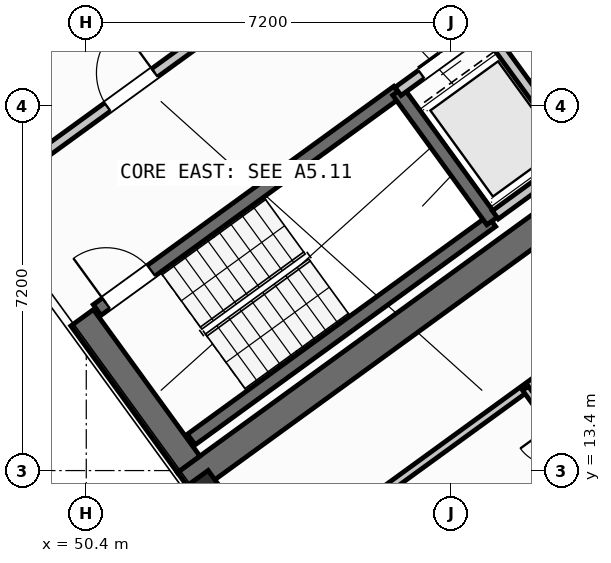
"""IFC4 building model, lengths in metres.
Left out: names, types, materials, properties, quantities, classifications, styles, units other than length and angle.
Written with IfcOpenShell. Run it as: python <this file> out.ifc"""

import sys

from ifc_helpers import new_model, si_unit, direction, frame, frame_2d, origin, origin_2d, place, context, subcontext, project, spatial, rectangle, hollow_rectangle, extrude, source, transform, mapped, element, fill, save


model = new_model("IFC4")
c1 = context("Model", 3, precision=1e-05, world=origin(), true_north=direction((0.0, 1.0)))
c2 = subcontext(c1, "Body", "Model", "MODEL_VIEW")
j1 = project(units=[si_unit("LENGTHUNIT", "METRE"), si_unit("PLANEANGLEUNIT", "RADIAN")], contexts=[c1])
p1 = place(None, origin())
s1 = spatial("IfcSite", under=j1, at=p1, CompositionType="ELEMENT")
p2 = place(p1, origin())
s2 = spatial("IfcBuilding", under=s1, at=p2, CompositionType="ELEMENT")
p3 = place(p2, frame((0.0, 0.0, 144.3)))
s3 = spatial("IfcBuildingStorey", under=s2, at=p3, CompositionType="ELEMENT", Elevation=144.3)
p4 = place(p3, frame((52.359, 13.14, 0.0), z_axis=(0.0, 0.0, 1.0), x_axis=(0.809014896919, 0.587788139183, 0.0)))
e1 = element("IfcWall", 1, at=p4, inside=s3, PredefinedType="SHEAR", context=c2, shape_type="SweptSolid", body=[
    extrude(rectangle(XDim=12.34, YDim=0.55, at=frame_2d((6.17, 0.0))), origin(), (0.0, 0.0, 1.0), 3.35),
])
p5 = place(p3, frame((52.42, 13.524, 0.0), z_axis=(0.0, 0.0, 1.0), x_axis=(-0.587802113096, 0.809004744015, 0.0)))
e2 = element("IfcWall", 2, at=p5, inside=s3, PredefinedType="SHEAR", context=c2, shape_type="SweptSolid", body=[
    extrude(rectangle(XDim=3.575, YDim=0.55, at=frame_2d((1.788, 0.0))), origin(), (0.0, 0.0, 1.0), 3.35),
])
m1 = source(origin(), c2, "Body", "SweptSolid", [
    extrude(hollow_rectangle(XDim=0.9, YDim=0.9, WallThickness=0.036, at=origin_2d()), origin(), (0.0, 0.0, 1.0), 3.6),
])
p6 = place(p3, frame((52.705, 12.773, 0.0), z_axis=(0.0, 0.0, 1.0), x_axis=(0.809016994375, 0.587785252292, 0.0)))
e3 = element("IfcColumn", 3, at=p6, inside=s3, PredefinedType="COLUMN", context=c2, shape_type="MappedRepresentation", body=[
    mapped(m1, transform((0.0, 0.0, 0.0), scale=1.0)),
])
p7 = place(p3, frame((58.455, 35.484, 0.0), z_axis=(0.0, 0.0, 1.0), x_axis=(0.587783625747, -0.809018176127, 0.0)))
e4 = element("IfcWall", 4, at=p7, inside=s3, PredefinedType="STANDARD", context=c2, shape_type="SweptSolid", body=[
    extrude(rectangle(XDim=21.587, YDim=0.32, at=frame_2d((10.794, 0.0))), origin(), (0.0, 0.0, 1.0), 2.775),
])
p8 = place(p7, frame((2.994, 0.0, 0.8)))
e5 = element("IfcOpeningElement", 5, at=p8, cuts=e4, PredefinedType="OPENING", context=c2, shape_type="SweptSolid", body=[
    extrude(rectangle(XDim=2.1, YDim=1.55, at=frame_2d((1.05, 0.775))), frame((0.0, 0.17, 0.0), z_axis=(0.0, -1.0, 0.0), x_axis=(1.0, 0.0, 0.0)), (0.0, 0.0, 1.0), 0.34),
])
p9 = place(p7, frame((11.959, 0.0, 0.85)))
e6 = element("IfcOpeningElement", 6, at=p9, cuts=e4, PredefinedType="OPENING", context=c2, shape_type="SweptSolid", body=[
    extrude(rectangle(XDim=1.8, YDim=1.5, at=frame_2d((0.9, 0.75))), frame((0.0, 0.17, 0.0), z_axis=(0.0, -1.0, 0.0), x_axis=(1.0, 0.0, 0.0)), (0.0, 0.0, 1.0), 0.34),
])
p10 = place(p7, frame((18.56, 0.0, 0.85)))
e7 = element("IfcOpeningElement", 7, at=p10, cuts=e4, PredefinedType="OPENING", context=c2, shape_type="SweptSolid", body=[
    extrude(rectangle(XDim=1.5, YDim=1.5, at=frame_2d((0.75, 0.75))), frame((0.0, 0.17, 0.0), z_axis=(0.0, -1.0, 0.0), x_axis=(1.0, 0.0, 0.0)), (0.0, 0.0, 1.0), 0.34),
])
p11 = place(p3, frame((71.098, 17.731, 0.0), z_axis=(0.0, 0.0, 1.0), x_axis=(-0.809021120468, -0.587779573171, 0.0)))
e8 = element("IfcWall", 8, at=p11, inside=s3, PredefinedType="STANDARD", context=c2, shape_type="SweptSolid", body=[
    extrude(rectangle(XDim=17.588, YDim=0.32, at=frame_2d((8.794, 0.0))), origin(), (0.0, 0.0, 1.0), 3.35),
])
p12 = place(p11, frame((1.624, 0.0, 0.0)))
e9 = element("IfcOpeningElement", 9, at=p12, cuts=e8, PredefinedType="OPENING", context=c2, shape_type="SweptSolid", body=[
    extrude(rectangle(XDim=1.05, YDim=2.15, at=frame_2d((0.525, 1.075))), frame((0.0, 0.17, 0.0), z_axis=(0.0, -1.0, 0.0), x_axis=(1.0, 0.0, 0.0)), (0.0, 0.0, 1.0), 0.34),
])
p13 = place(p11, frame((4.104, 0.0, 1.0)))
e10 = element("IfcOpeningElement", 10, at=p13, cuts=e8, PredefinedType="OPENING", context=c2, shape_type="SweptSolid", body=[
    extrude(rectangle(XDim=0.9, YDim=1.25, at=frame_2d((0.45, 0.625))), frame((0.0, 0.17, 0.0), z_axis=(0.0, -1.0, 0.0), x_axis=(1.0, 0.0, 0.0)), (0.0, 0.0, 1.0), 0.34),
])
p14 = place(p11, frame((7.879, 0.0, 0.85)))
e11 = element("IfcOpeningElement", 11, at=p14, cuts=e8, PredefinedType="OPENING", context=c2, shape_type="SweptSolid", body=[
    extrude(rectangle(XDim=1.8, YDim=1.5, at=frame_2d((0.9, 0.75))), frame((0.0, 0.17, 0.0), z_axis=(0.0, -1.0, 0.0), x_axis=(1.0, 0.0, 0.0)), (0.0, 0.0, 1.0), 0.34),
])
p15 = place(p11, frame((12.849, 0.0, 0.85)))
e12 = element("IfcOpeningElement", 12, at=p15, cuts=e8, PredefinedType="OPENING", context=c2, shape_type="SweptSolid", body=[
    extrude(rectangle(XDim=1.8, YDim=1.5, at=frame_2d((0.9, 0.75))), frame((0.0, 0.17, 0.0), z_axis=(0.0, -1.0, 0.0), x_axis=(1.0, 0.0, 0.0)), (0.0, 0.0, 1.0), 0.34),
])
p16 = place(p3, frame((52.472, 14.013, 0.0), z_axis=(0.0, 0.0, 1.0), x_axis=(0.809028366311, 0.587769599847, 0.0)))
e13 = element("IfcWall", 13, at=p16, inside=s3, PredefinedType="SHEAR", context=c2, shape_type="SweptSolid", body=[
    extrude(rectangle(XDim=7.33, YDim=0.26, at=frame_2d((3.665, 0.0))), origin(), (0.0, 0.0, 1.0), 3.35),
])
p17 = place(p3, frame((50.615, 16.57, 0.0), z_axis=(0.0, 0.0, 1.0), x_axis=(0.809028366311, 0.587769599847, 0.0)))
e14 = element("IfcWall", 14, at=p17, inside=s3, PredefinedType="SHEAR", context=c2, shape_type="SweptSolid", body=[
    extrude(rectangle(XDim=7.33, YDim=0.26, at=frame_2d((3.665, 0.0))), origin(), (0.0, 0.0, 1.0), 3.35),
])
p18 = place(p17, frame((0.22, 0.0, 0.0)))
e15 = element("IfcOpeningElement", 15, at=p18, cuts=e14, PredefinedType="OPENING", context=c2, shape_type="SweptSolid", body=[
    extrude(rectangle(XDim=1.1, YDim=2.1, at=frame_2d((0.55, 1.05))), frame((0.0, 0.14, 0.0), z_axis=(0.0, -1.0, 0.0), x_axis=(1.0, 0.0, 0.0)), (0.0, 0.0, 1.0), 0.28),
])
p19 = place(p3, frame((58.41, 18.327, 0.0), z_axis=(0.0, 0.0, 1.0), x_axis=(-0.58776738483, 0.809029975545, 0.0)))
e16 = element("IfcWall", 16, at=p19, inside=s3, PredefinedType="SHEAR", context=c2, shape_type="SweptSolid", body=[
    extrude(rectangle(XDim=3.16, YDim=0.26, at=frame_2d((1.58, 0.0))), origin(), (0.0, 0.0, 1.0), 3.35),
])
p20 = place(p3, frame((47.065, 21.407, 0.0), z_axis=(0.0, 0.0, 1.0), x_axis=(0.809032984992, 0.587763242466, 0.0)))
e17 = element("IfcWall", 17, at=p20, inside=s3, PredefinedType="STANDARD", context=c2, shape_type="SweptSolid", body=[
    extrude(rectangle(XDim=3.448, YDim=0.2, at=frame_2d((1.724, 0.0))), origin(), (0.0, 0.0, 1.0), 3.34),
])
p21 = place(p20, frame((0.458, 0.0, 0.0)))
e18 = element("IfcOpeningElement", 18, at=p21, cuts=e17, PredefinedType="OPENING", context=c2, shape_type="SweptSolid", body=[
    extrude(rectangle(XDim=1.3, YDim=2.2, at=frame_2d((0.65, 1.1))), frame((0.0, 0.11, 0.0), z_axis=(0.0, -1.0, 0.0), x_axis=(1.0, 0.0, 0.0)), (0.0, 0.0, 1.0), 0.22),
])
p22 = place(p3, frame((48.758, 19.077, 0.0), z_axis=(0.0, 0.0, 1.0), x_axis=(0.809005065155, 0.587801671104, 0.0)))
e19 = element("IfcWall", 19, at=p22, inside=s3, PredefinedType="STANDARD", context=c2, shape_type="SweptSolid", body=[
    extrude(rectangle(XDim=5.768, YDim=0.2, at=frame_2d((2.884, 0.0))), origin(), (0.0, 0.0, 1.0), 3.34),
])
p23 = place(p22, frame((2.548, 0.0, 0.0)))
e20 = element("IfcOpeningElement", 20, at=p23, cuts=e19, PredefinedType="OPENING", context=c2, shape_type="SweptSolid", body=[
    extrude(rectangle(XDim=1.15, YDim=2.1, at=frame_2d((0.575, 1.05))), frame((0.0, 0.11, 0.0), z_axis=(0.0, -1.0, 0.0), x_axis=(1.0, 0.0, 0.0)), (0.0, 0.0, 1.0), 0.22),
])
p24 = place(p3, frame((56.553, 20.884, 0.0), z_axis=(0.0, 0.0, 1.0), x_axis=(0.809023564264, 0.58777620951, 0.0)))
e21 = element("IfcWall", 21, at=p24, inside=s3, PredefinedType="STANDARD", context=c2, shape_type="SweptSolid", body=[
    extrude(rectangle(XDim=3.818, YDim=0.2, at=frame_2d((1.909, 0.0))), origin(), (0.0, 0.0, 1.0), 3.34),
])
p25 = place(p24, frame((0.57, 0.0, 0.0)))
e22 = element("IfcOpeningElement", 22, at=p25, cuts=e21, PredefinedType="OPENING", context=c2, shape_type="SweptSolid", body=[
    extrude(rectangle(XDim=1.1, YDim=2.15, at=frame_2d((0.55, 1.075))), frame((0.0, 0.11, 0.0), z_axis=(0.0, -1.0, 0.0), x_axis=(1.0, 0.0, 0.0)), (0.0, 0.0, 1.0), 0.22),
])
p26 = place(p24, frame((2.65, 0.0, 0.0)))
e23 = element("IfcOpeningElement", 23, at=p26, cuts=e21, PredefinedType="OPENING", context=c2, shape_type="SweptSolid", body=[
    extrude(rectangle(XDim=0.86, YDim=2.05, at=frame_2d((0.43, 1.025))), frame((0.0, 0.11, 0.0), z_axis=(0.0, -1.0, 0.0), x_axis=(1.0, 0.0, 0.0)), (0.0, 0.0, 1.0), 0.22),
])
p27 = place(p3, frame((60.067, 19.655, 0.0), z_axis=(0.0, 0.0, 1.0), x_axis=(-0.587800520745, 0.809005900975, 0.0)))
e24 = element("IfcWall", 24, at=p27, inside=s3, PredefinedType="STANDARD", context=c2, shape_type="SweptSolid", body=[
    extrude(rectangle(XDim=2.66, YDim=0.2, at=frame_2d((1.33, 0.0))), origin(), (0.0, 0.0, 1.0), 3.34),
])
p28 = place(p3, frame((58.472, 18.447, 0.0), z_axis=(0.0, 0.0, 1.0), x_axis=(0.809018631237, 0.587782999339, 0.0)))
e25 = element("IfcWall", 25, at=p28, inside=s3, PredefinedType="STANDARD", context=c2, shape_type="SweptSolid", body=[
    extrude(rectangle(XDim=3.698, YDim=0.2, at=frame_2d((1.849, 0.0))), origin(), (0.0, 0.0, 1.0), 3.34),
])
p29 = place(p3, frame((53.705, 11.126, 0.0), z_axis=(0.0, 0.0, 1.0), x_axis=(0.809014504436, 0.587788679384, 0.0)))
e26 = element("IfcWall", 26, at=p29, inside=s3, PredefinedType="PARTITIONING", context=c2, shape_type="SweptSolid", body=[
    extrude(rectangle(XDim=14.67, YDim=0.16, at=frame_2d((7.335, 0.0))), origin(), (0.0, 0.0, 1.0), 3.34),
])
p30 = place(p29, frame((10.2, 0.0, 0.0)))
e27 = element("IfcOpeningElement", 27, at=p30, cuts=e26, PredefinedType="OPENING", context=c2, shape_type="SweptSolid", body=[
    extrude(rectangle(XDim=1.0, YDim=2.1, at=frame_2d((0.5, 1.05))), frame((0.0, 0.09, 0.0), z_axis=(0.0, -1.0, 0.0), x_axis=(1.0, 0.0, 0.0)), (0.0, 0.0, 1.0), 0.18),
])
p31 = place(p3, frame((56.249, 9.785, 0.0), z_axis=(0.0, 0.0, 1.0), x_axis=(0.809011747655, 0.587792473715, 0.0)))
e28 = element("IfcWall", 28, at=p31, inside=s3, PredefinedType="PLUMBINGWALL", context=c2, shape_type="SweptSolid", body=[
    extrude(rectangle(XDim=13.4, YDim=0.14, at=frame_2d((6.7, 0.0))), origin(), (0.0, 0.0, 1.0), 3.34),
])
p32 = place(p31, frame((8.94, 0.0, 0.0)))
e29 = element("IfcOpeningElement", 29, at=p32, cuts=e28, PredefinedType="OPENING", context=c2, shape_type="SweptSolid", body=[
    extrude(rectangle(XDim=0.92, YDim=2.08, at=frame_2d((0.46, 1.04))), frame((0.0, 0.08, 0.0), z_axis=(0.0, -1.0, 0.0), x_axis=(1.0, 0.0, 0.0)), (0.0, 0.0, 1.0), 0.16),
])
p33 = place(p3, frame((60.585, 12.936, 0.0), z_axis=(0.0, 0.0, 1.0), x_axis=(-0.587772116736, 0.809026537752, 0.0)))
e30 = element("IfcWall", 30, at=p33, inside=s3, PredefinedType="PLUMBINGWALL", context=c2, shape_type="SweptSolid", body=[
    extrude(rectangle(XDim=2.58, YDim=0.14, at=frame_2d((1.29, 0.0))), origin(), (0.0, 0.0, 1.0), 3.34),
])
p34 = place(p33, frame((0.9, 0.0, 0.0)))
e31 = element("IfcOpeningElement", 31, at=p34, cuts=e30, PredefinedType="OPENING", context=c2, shape_type="SweptSolid", body=[
    extrude(rectangle(XDim=0.78, YDim=2.05, at=frame_2d((0.39, 1.025))), frame((0.0, 0.08, 0.0), z_axis=(0.0, -1.0, 0.0), x_axis=(1.0, 0.0, 0.0)), (0.0, 0.0, 1.0), 0.16),
])
m2 = source(origin(), c2, "Body", "SweptSolid", [
    extrude(rectangle(XDim=1.1, YDim=2.1, at=frame_2d((0.55, 1.05))), frame((0.0, 0.025, 0.0), z_axis=(0.0, -1.0, 0.0), x_axis=(1.0, 0.0, 0.0)), (0.0, 0.0, 1.0), 0.05),
])
p35 = place(p18, origin())
e32 = element("IfcDoor", 32, at=p35, inside=s3, OperationType="SINGLE_SWING_LEFT", PredefinedType="DOOR", context=c2, shape_type="MappedRepresentation", body=[
    mapped(m2, transform((0.0, 0.0, 0.0), scale=1.0)),
])
fill(e15, e32)
m3 = source(origin(), c2, "Body", "SweptSolid", [
    extrude(rectangle(XDim=1.15, YDim=2.1, at=frame_2d((0.575, 1.05))), frame((0.0, 0.025, 0.0), z_axis=(0.0, -1.0, 0.0), x_axis=(1.0, 0.0, 0.0)), (0.0, 0.0, 1.0), 0.05),
])
p36 = place(p23, origin())
e33 = element("IfcDoor", 33, at=p36, inside=s3, OperationType="SINGLE_SWING_RIGHT", PredefinedType="DOOR", context=c2, shape_type="MappedRepresentation", body=[
    mapped(m3, transform((0.0, 0.0, 0.0), scale=1.0)),
])
fill(e20, e33)
m4 = source(origin(), c2, "Body", "SweptSolid", [
    extrude(rectangle(XDim=1.1, YDim=2.15, at=frame_2d((0.55, 1.075))), frame((0.0, 0.025, 0.0), z_axis=(0.0, -1.0, 0.0), x_axis=(1.0, 0.0, 0.0)), (0.0, 0.0, 1.0), 0.05),
])
p37 = place(p25, origin())
e34 = element("IfcDoor", 34, at=p37, inside=s3, OperationType="DOUBLE_DOOR_SLIDING", PredefinedType="DOOR", context=c2, shape_type="MappedRepresentation", body=[
    mapped(m4, transform((0.0, 0.0, 0.0), scale=1.0)),
])
fill(e22, e34)
save(model, sys.argv[1])
